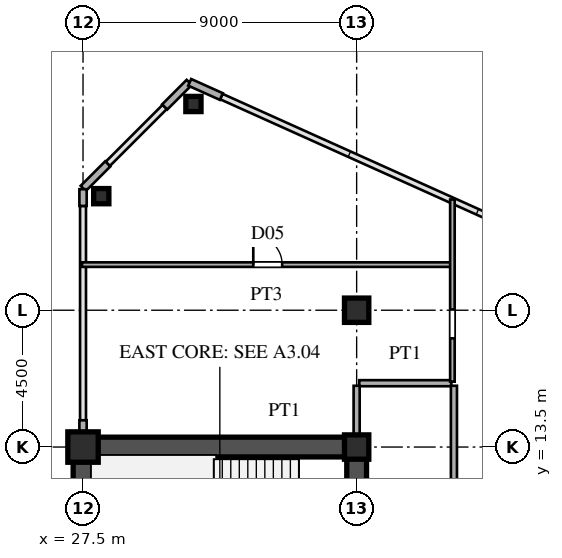
"""IFC4 building model, lengths in metres.
Left out: names, types, materials, properties, quantities, classifications, styles, units other than length and angle.
Written with IfcOpenShell. Run it as: python <this file> out.ifc"""

import sys

from ifc_helpers import new_model, si_unit, direction, frame, frame_2d, origin, origin_2d, place, context, subcontext, project, spatial, rectangle, hollow_rectangle, i_section, extrude, source, transform, mapped, element, fill, save


model = new_model("IFC4")
c1 = context("Model", 3, precision=1e-05, world=origin(), true_north=direction((0.0, 1.0)))
c2 = subcontext(c1, "Body", "Model", "MODEL_VIEW")
j1 = project(units=[si_unit("LENGTHUNIT", "METRE"), si_unit("PLANEANGLEUNIT", "RADIAN")], contexts=[c1])
p1 = place(None, origin())
s1 = spatial("IfcSite", under=j1, at=p1, CompositionType="ELEMENT")
p2 = place(p1, origin())
s2 = spatial("IfcBuilding", under=s1, at=p2, CompositionType="ELEMENT")
p3 = place(p2, frame((0.0, 0.0, 62.1)))
s3 = spatial("IfcBuildingStorey", under=s2, at=p3, CompositionType="ELEMENT", Elevation=62.1)
m1 = source(origin(), c2, "Body", "SweptSolid", [
    extrude(hollow_rectangle(XDim=1.0, YDim=1.0, WallThickness=0.042, at=origin_2d()), origin(), (0.0, 0.0, 1.0), 3.6),
])
p4 = place(p3, frame((27.5, 13.5, 0.0), z_axis=(0.0, 0.0, 1.0), x_axis=(1.0, 0.0, 0.0)))
e1 = element("IfcColumn", 1, at=p4, inside=s3, PredefinedType="COLUMN", context=c2, shape_type="MappedRepresentation", body=[
    mapped(m1, transform((0.0, 0.0, 0.0), scale=1.0)),
])
m2 = source(origin(), c2, "Body", "SweptSolid", [
    extrude(i_section(OverallWidth=0.8, OverallDepth=0.8, WebThickness=0.032, FlangeThickness=0.05, at=origin_2d()), origin(), (0.0, 0.0, 1.0), 3.6),
])
for number, where, z_axis, x_axis in (
    (2, (36.5, 13.5, 0.0), (0.0, 0.0, 1.0), (1.0, 0.0, 0.0)),
    (3, (36.5, 18.0, 0.0), (0.0, 0.0, 1.0), (1.0, 0.0, 0.0)),
):
    element("IfcColumn", number, at=place(p3, frame(where, z_axis=z_axis, x_axis=x_axis)), inside=s3, PredefinedType="COLUMN", context=c2, shape_type="MappedRepresentation", body=[
        mapped(m2, transform((0.0, 0.0, 0.0), scale=1.0)),
    ])
m3 = source(origin(), c2, "Body", "SweptSolid", [
    extrude(hollow_rectangle(XDim=0.5, YDim=0.5, WallThickness=0.02, at=origin_2d()), origin(), (0.0, 0.0, 1.0), 3.6),
])
for number, where, z_axis, x_axis in (
    (4, (31.131, 24.783, 0.0), (0.0, 0.0, 1.0), (1.0, 0.0, 0.0)),
    (5, (28.1, 21.751, 0.0), (0.0, 0.0, 1.0), (1.0, 0.0, 0.0)),
):
    element("IfcColumn", number, at=place(p3, frame(where, z_axis=z_axis, x_axis=x_axis)), inside=s3, PredefinedType="COLUMN", context=c2, shape_type="MappedRepresentation", body=[
        mapped(m3, transform((0.0, 0.0, 0.0), scale=1.0)),
    ])
p5 = place(p3, frame((32.049, 25.028, 0.0), z_axis=(0.0, 0.0, 1.0), x_axis=(-0.911929519623, 0.410346866979, 0.0)))
e6 = element("IfcWall", 6, at=p5, inside=s3, PredefinedType="SOLIDWALL", context=c2, shape_type="SweptSolid", body=[
    extrude(rectangle(XDim=1.14, YDim=0.24, at=frame_2d((0.57, 0.0))), origin(), (0.0, 0.0, 1.0), 3.38),
])
for number, where, z_axis, x_axis in (
    (7, (30.993, 25.493, 0.0), (0.0, 0.0, 1.0), (-0.707, -0.707, 0.0)),
    (8, (28.313, 22.813, 0.0), (0.0, 0.0, 1.0), (-0.707, -0.707, 0.0)),
):
    element("IfcWall", number, at=place(p3, frame(where, z_axis=z_axis, x_axis=x_axis)), inside=s3, PredefinedType="SOLIDWALL", context=c2, shape_type="SweptSolid", body=[
        extrude(rectangle(XDim=1.14, YDim=0.24, at=frame_2d((0.57, 0.0))), origin(), (0.0, 0.0, 1.0), 3.38),
    ])
p6 = place(p3, frame((27.5, 13.83, 0.0), z_axis=(0.0, 0.0, 1.0), x_axis=(0.0, 1.0, 0.0)))
e9 = element("IfcWall", 9, at=p6, inside=s3, PredefinedType="SOLIDWALL", context=c2, shape_type="SweptSolid", body=[
    extrude(rectangle(XDim=0.55, YDim=0.24, at=frame_2d((0.275, 0.0))), origin(), (0.0, 0.0, 1.0), 2.88),
])
p7 = place(p3, frame((27.5, 21.43, 0.0), z_axis=(0.0, 0.0, 1.0), x_axis=(0.0, 1.0, 0.0)))
e10 = element("IfcWall", 10, at=p7, inside=s3, PredefinedType="SOLIDWALL", context=c2, shape_type="SweptSolid", body=[
    extrude(rectangle(XDim=0.55, YDim=0.24, at=frame_2d((0.275, 0.0))), origin(), (0.0, 0.0, 1.0), 3.38),
])
p8 = place(p3, frame((27.5, 1.3, 0.0), z_axis=(0.0, 0.0, 1.0), x_axis=(0.0, 1.0, 0.0)))
e11 = element("IfcWall", 11, at=p8, inside=s3, PredefinedType="SHEAR", context=c2, shape_type="SweptSolid", body=[
    extrude(rectangle(XDim=12.2, YDim=0.65, at=frame_2d((6.1, 0.0))), origin(), (0.0, 0.0, 1.0), 3.38),
])
p9 = place(p3, frame((27.5, 13.5, 0.0), z_axis=(0.0, 0.0, 1.0), x_axis=(1.0, 0.0, 0.0)))
e12 = element("IfcWall", 12, at=p9, inside=s3, PredefinedType="SHEAR", context=c2, shape_type="SweptSolid", body=[
    extrude(rectangle(XDim=9.0, YDim=0.65, at=frame_2d((4.5, 0.0))), origin(), (0.0, 0.0, 1.0), 3.38),
])
p10 = place(p3, frame((36.5, 8.2, 0.0), z_axis=(0.0, 0.0, 1.0), x_axis=(0.0, 1.0, 0.0)))
e13 = element("IfcWall", 13, at=p10, inside=s3, PredefinedType="SHEAR", context=c2, shape_type="SweptSolid", body=[
    extrude(rectangle(XDim=5.45, YDim=0.65, at=frame_2d((2.725, 0.0))), origin(), (0.0, 0.0, 1.0), 3.38),
])
p11 = place(p10, frame((0.245, 0.0, 0.0)))
e14 = element("IfcOpeningElement", 14, at=p11, cuts=e13, PredefinedType="OPENING", context=c2, shape_type="SweptSolid", body=[
    extrude(rectangle(XDim=0.95, YDim=2.15, at=frame_2d((0.475, 1.075))), frame((0.0, 0.335, 0.0), z_axis=(0.0, -1.0, 0.0), x_axis=(1.0, 0.0, 0.0)), (0.0, 0.0, 1.0), 0.67),
])
p12 = place(p3, frame((36.585, 15.6, 0.0), z_axis=(0.0, 0.0, 1.0), x_axis=(1.0, 0.0, 0.0)))
e15 = element("IfcWall", 15, at=p12, inside=s3, PredefinedType="PARTITIONING", context=c2, shape_type="SweptSolid", body=[
    extrude(rectangle(XDim=3.03, YDim=0.2, at=frame_2d((1.515, 0.0))), origin(), (0.0, 0.0, 1.0), 3.38),
])
p13 = place(p3, frame((27.465, 19.5, 0.0), z_axis=(0.0, 0.0, 1.0), x_axis=(1.0, 0.0, 0.0)))
e16 = element("IfcWall", 16, at=p13, inside=s3, PredefinedType="PARTITIONING", context=c2, shape_type="SweptSolid", body=[
    extrude(rectangle(XDim=12.135, YDim=0.15, at=frame_2d((6.067, 0.0))), origin(), (0.0, 0.0, 1.0), 3.38),
])
p14 = place(p13, frame((5.635, 0.0, 0.0)))
e17 = element("IfcOpeningElement", 17, at=p14, cuts=e16, PredefinedType="OPENING", context=c2, shape_type="SweptSolid", body=[
    extrude(rectangle(XDim=0.95, YDim=2.15, at=frame_2d((0.475, 1.075))), frame((0.0, 0.085, 0.0), z_axis=(0.0, -1.0, 0.0), x_axis=(1.0, 0.0, 0.0)), (0.0, 0.0, 1.0), 0.17),
])
p15 = place(p3, frame((36.5, 13.83, 0.0), z_axis=(0.0, 0.0, 1.0), x_axis=(0.0, 1.0, 0.0)))
e18 = element("IfcWall", 18, at=p15, inside=s3, PredefinedType="PARTITIONING", context=c2, shape_type="SweptSolid", body=[
    extrude(rectangle(XDim=1.685, YDim=0.2, at=frame_2d((0.842, 0.0))), origin(), (0.0, 0.0, 1.0), 2.68),
])
p16 = place(p3, frame((39.65, 15.65, 0.0), z_axis=(0.0, 0.0, 1.0), x_axis=(0.0, 1.0, 0.0)))
e19 = element("IfcWall", 19, at=p16, inside=s3, PredefinedType="PARTITIONING", context=c2, shape_type="SweptSolid", body=[
    extrude(rectangle(XDim=5.992, YDim=0.15, at=frame_2d((2.996, 0.0))), origin(), (0.0, 0.0, 1.0), 3.38),
])
p17 = place(p16, frame((1.425, 0.0, 0.0)))
e20 = element("IfcOpeningElement", 20, at=p17, cuts=e19, PredefinedType="OPENING", context=c2, shape_type="SweptSolid", body=[
    extrude(rectangle(XDim=0.95, YDim=2.15, at=frame_2d((0.475, 1.075))), frame((0.0, 0.085, 0.0), z_axis=(0.0, -1.0, 0.0), x_axis=(1.0, 0.0, 0.0)), (0.0, 0.0, 1.0), 0.17),
])
p18 = place(p3, frame((39.7, -15.515, 0.0), z_axis=(0.0, 0.0, 1.0), x_axis=(0.0, 1.0, 0.0)))
e21 = element("IfcWall", 21, at=p18, inside=s3, PredefinedType="PARTITIONING", context=c2, shape_type="SweptSolid", body=[
    extrude(rectangle(XDim=31.03, YDim=0.2, at=frame_2d((15.515, 0.0))), origin(), (0.0, 0.0, 1.0), 3.38),
])
p19 = place(p18, frame((0.16, 0.0, 0.0)))
e22 = element("IfcOpeningElement", 22, at=p19, cuts=e21, PredefinedType="OPENING", context=c2, shape_type="SweptSolid", body=[
    extrude(rectangle(XDim=1.05, YDim=2.25, at=frame_2d((0.525, 1.125))), frame((0.0, 0.11, 0.0), z_axis=(0.0, -1.0, 0.0), x_axis=(1.0, 0.0, 0.0)), (0.0, 0.0, 1.0), 0.22),
])
p20 = place(p18, frame((10.28, 0.0, 0.0)))
e23 = element("IfcOpeningElement", 23, at=p20, cuts=e21, PredefinedType="OPENING", context=c2, shape_type="SweptSolid", body=[
    extrude(rectangle(XDim=1.05, YDim=2.25, at=frame_2d((0.525, 1.125))), frame((0.0, 0.11, 0.0), z_axis=(0.0, -1.0, 0.0), x_axis=(1.0, 0.0, 0.0)), (0.0, 0.0, 1.0), 0.22),
])
p21 = place(p18, frame((24.067, 0.0, 0.0)))
e24 = element("IfcOpeningElement", 24, at=p21, cuts=e21, PredefinedType="OPENING", context=c2, shape_type="SweptSolid", body=[
    extrude(rectangle(XDim=1.05, YDim=2.25, at=frame_2d((0.525, 1.125))), frame((0.0, 0.11, 0.0), z_axis=(0.0, -1.0, 0.0), x_axis=(1.0, 0.0, 0.0)), (0.0, 0.0, 1.0), 0.22),
])
m4 = source(origin(), c2, "Body", "SweptSolid", [
    extrude(rectangle(XDim=0.95, YDim=2.15, at=frame_2d((0.475, 1.075))), frame((0.0, 0.025, 0.0), z_axis=(0.0, -1.0, 0.0), x_axis=(1.0, 0.0, 0.0)), (0.0, 0.0, 1.0), 0.05),
])
p22 = place(p14, origin())
e25 = element("IfcDoor", 25, at=p22, inside=s3, OperationType="SINGLE_SWING_LEFT", PredefinedType="DOOR", context=c2, shape_type="MappedRepresentation", body=[
    mapped(m4, transform((0.0, 0.0, 0.0), scale=1.0)),
])
fill(e17, e25)
save(model, sys.argv[1])
